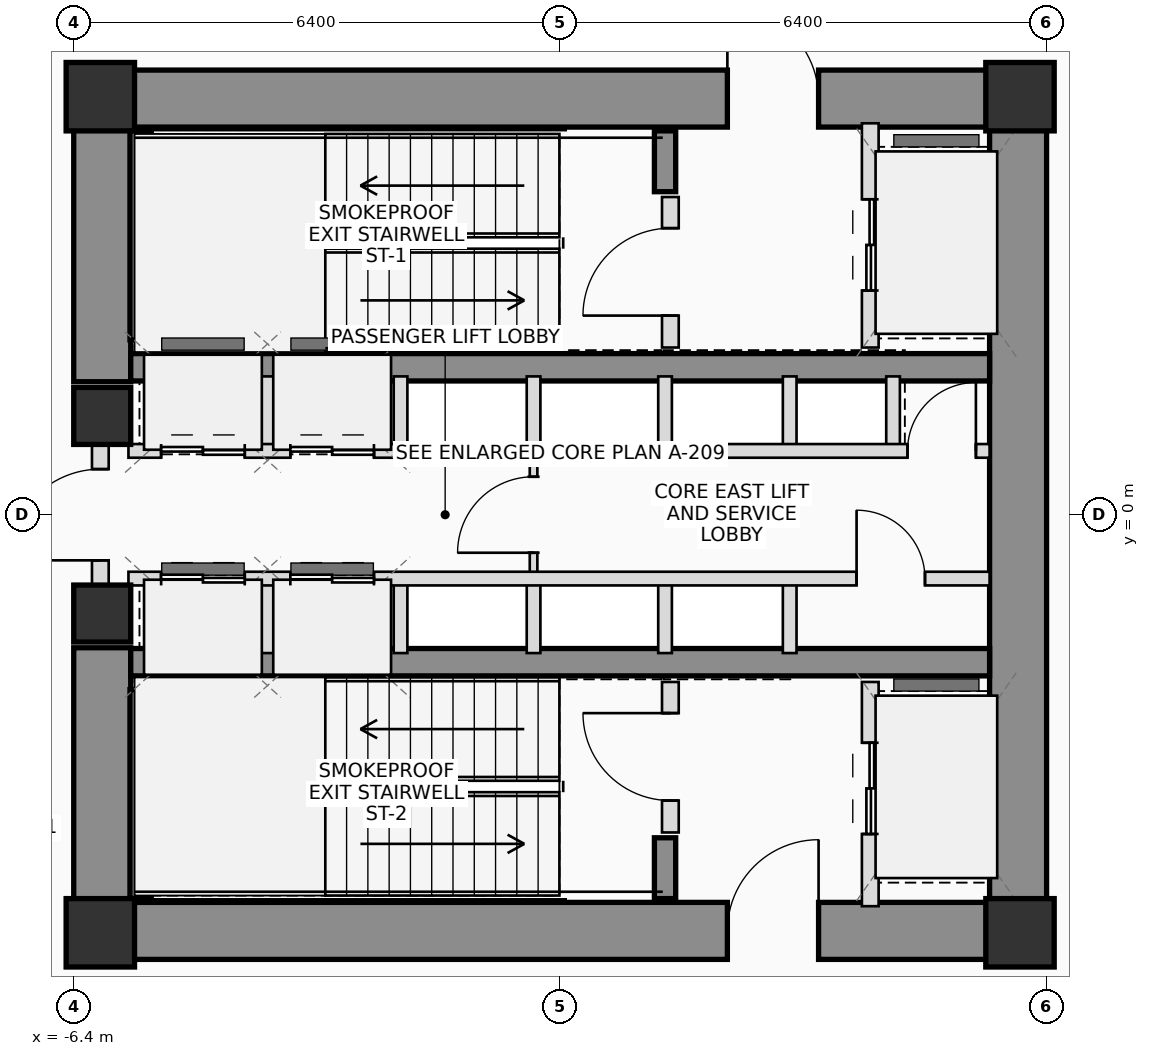
"""IFC4 building model, lengths in metres.
Left out: names, types, materials, properties, quantities, classifications, styles, units other than length and angle.
Written with IfcOpenShell. Run it as: python <this file> out.ifc"""

import sys

from ifc_helpers import new_model, si_unit, direction, frame, frame_2d, origin, origin_2d, place, context, subcontext, project, spatial, rectangle, extrude, source, transform, mapped, element, fill, save


model = new_model("IFC4")
c1 = context("Model", 3, precision=1e-05, world=origin(), true_north=direction((0.0, 1.0)))
c2 = subcontext(c1, "Body", "Model", "MODEL_VIEW")
j1 = project(units=[si_unit("LENGTHUNIT", "METRE"), si_unit("PLANEANGLEUNIT", "RADIAN")], contexts=[c1])
p1 = place(None, origin())
s1 = spatial("IfcSite", under=j1, at=p1, CompositionType="ELEMENT")
p2 = place(p1, origin())
s2 = spatial("IfcBuilding", under=s1, at=p2, CompositionType="ELEMENT")
p3 = place(p2, frame((0.0, 0.0, 101.15)))
s3 = spatial("IfcBuildingStorey", under=s2, at=p3, CompositionType="ELEMENT", Elevation=101.15)
m1 = source(origin(), c2, "Body", "SweptSolid", [
    extrude(rectangle(XDim=0.9, YDim=0.9, at=origin_2d()), origin(), (0.0, 0.0, 1.0), 3.75),
])
for number, where, z_axis, x_axis in (
    (1, (-6.05, -5.5, 0.0), (0.0, 0.0, 1.0), (1.0, 0.0, 0.0)),
    (2, (6.05, -5.5, 0.0), (0.0, 0.0, 1.0), (1.0, 0.0, 0.0)),
    (3, (6.05, 5.5, 0.0), (0.0, 0.0, 1.0), (1.0, 0.0, 0.0)),
    (4, (-6.05, 5.5, 0.0), (0.0, 0.0, 1.0), (1.0, 0.0, 0.0)),
):
    element("IfcColumn", number, at=place(p3, frame(where, z_axis=z_axis, x_axis=x_axis)), inside=s3, PredefinedType="COLUMN", context=c2, shape_type="MappedRepresentation", body=[
        mapped(m1, transform((0.0, 0.0, 0.0), scale=1.0)),
    ])
p4 = place(p3, frame((-6.4, 5.475, 0.0), z_axis=(0.0, 0.0, 1.0), x_axis=(1.0, 0.0, 0.0)))
e5 = element("IfcWall", 5, at=p4, inside=s3, PredefinedType="SHEAR", context=c2, shape_type="SweptSolid", body=[
    extrude(rectangle(XDim=12.8, YDim=0.75, at=frame_2d((6.4, 0.0))), origin(), (0.0, 0.0, 1.0), 3.75),
])
p5 = place(p4, frame((8.6, 0.0, 0.0)))
e6 = element("IfcOpeningElement", 6, at=p5, cuts=e5, PredefinedType="OPENING", context=c2, shape_type="SweptSolid", body=[
    extrude(rectangle(XDim=1.2, YDim=2.2, at=frame_2d((0.6, 1.1))), frame((0.0, 0.385, 0.0), z_axis=(0.0, -1.0, 0.0), x_axis=(1.0, 0.0, 0.0)), (0.0, 0.0, 1.0), 0.77),
])
p6 = place(p3, frame((-6.4, -5.475, 0.0), z_axis=(0.0, 0.0, 1.0), x_axis=(1.0, 0.0, 0.0)))
e7 = element("IfcWall", 7, at=p6, inside=s3, PredefinedType="SHEAR", context=c2, shape_type="SweptSolid", body=[
    extrude(rectangle(XDim=12.8, YDim=0.75, at=frame_2d((6.4, 0.0))), origin(), (0.0, 0.0, 1.0), 3.75),
])
p7 = place(p6, frame((8.6, 0.0, 0.0)))
e8 = element("IfcOpeningElement", 8, at=p7, cuts=e7, PredefinedType="OPENING", context=c2, shape_type="SweptSolid", body=[
    extrude(rectangle(XDim=1.2, YDim=2.2, at=frame_2d((0.6, 1.1))), frame((0.0, 0.385, 0.0), z_axis=(0.0, -1.0, 0.0), x_axis=(1.0, 0.0, 0.0)), (0.0, 0.0, 1.0), 0.77),
])
p8 = place(p3, frame((6.025, -5.1, 0.0), z_axis=(0.0, 0.0, 1.0), x_axis=(0.0, 1.0, 0.0)))
e9 = element("IfcWall", 9, at=p8, inside=s3, PredefinedType="SHEAR", context=c2, shape_type="SweptSolid", body=[
    extrude(rectangle(XDim=10.2, YDim=0.75, at=frame_2d((5.1, 0.0))), origin(), (0.0, 0.0, 1.0), 3.75),
])
for number, where, z_axis, x_axis in (
    (10, (-6.025, -5.1, 0.0), (0.0, 0.0, 1.0), (0.0, 1.0, 0.0)),
    (11, (-6.025, 1.75, 0.0), (0.0, 0.0, 1.0), (0.0, 1.0, 0.0)),
):
    element("IfcWall", number, at=place(p3, frame(where, z_axis=z_axis, x_axis=x_axis)), inside=s3, PredefinedType="SHEAR", context=c2, shape_type="SweptSolid", body=[
        extrude(rectangle(XDim=3.35, YDim=0.75, at=frame_2d((1.675, 0.0))), origin(), (0.0, 0.0, 1.0), 3.75),
    ])
for number, where, z_axis, x_axis in (
    (12, (-5.65, 1.94, 0.0), (0.0, 0.0, 1.0), (1.0, 0.0, 0.0)),
    (13, (-5.65, -1.94, 0.0), (0.0, 0.0, 1.0), (1.0, 0.0, 0.0)),
):
    element("IfcWall", number, at=place(p3, frame(where, z_axis=z_axis, x_axis=x_axis)), inside=s3, PredefinedType="SHEAR", context=c2, shape_type="SweptSolid", body=[
        extrude(rectangle(XDim=11.3, YDim=0.36, at=frame_2d((5.65, 0.0))), origin(), (0.0, 0.0, 1.0), 3.75),
    ])
p9 = place(p3, frame((-5.52, 2.3, 0.0), z_axis=(0.0, 0.0, 1.0), x_axis=(0.0, 1.0, 0.0)))
e14 = element("IfcWall", 14, at=p9, inside=s3, PredefinedType="SHEAR", context=c2, shape_type="SweptSolid", body=[
    extrude(rectangle(XDim=2.75, YDim=0.28, at=frame_2d((1.375, 0.0))), origin(), (0.0, 0.0, 1.0), 3.75),
])
p10 = place(p3, frame((1.38, 4.25, 0.0), z_axis=(0.0, 0.0, 1.0), x_axis=(0.0, 1.0, 0.0)))
e15 = element("IfcWall", 15, at=p10, inside=s3, PredefinedType="SHEAR", context=c2, shape_type="SweptSolid", body=[
    extrude(rectangle(XDim=0.8, YDim=0.28, at=frame_2d((0.4, 0.0))), origin(), (0.0, 0.0, 1.0), 3.75),
])
p11 = place(p3, frame((-5.52, -5.05, 0.0), z_axis=(0.0, 0.0, 1.0), x_axis=(0.0, 1.0, 0.0)))
e16 = element("IfcWall", 16, at=p11, inside=s3, PredefinedType="SHEAR", context=c2, shape_type="SweptSolid", body=[
    extrude(rectangle(XDim=2.75, YDim=0.28, at=frame_2d((1.375, 0.0))), origin(), (0.0, 0.0, 1.0), 3.75),
])
p12 = place(p3, frame((1.38, -5.05, 0.0), z_axis=(0.0, 0.0, 1.0), x_axis=(0.0, 1.0, 0.0)))
e17 = element("IfcWall", 17, at=p12, inside=s3, PredefinedType="SHEAR", context=c2, shape_type="SweptSolid", body=[
    extrude(rectangle(XDim=0.8, YDim=0.28, at=frame_2d((0.4, 0.0))), origin(), (0.0, 0.0, 1.0), 3.75),
])
m2 = source(origin(), c2, "Body", "SweptSolid", [
    extrude(rectangle(XDim=0.75, YDim=0.75, at=origin_2d()), origin(), (0.0, 0.0, 1.0), 3.75),
])
for number, where, z_axis, x_axis in (
    (18, (-6.025, -1.3, 0.0), (0.0, 0.0, 1.0), (1.0, 0.0, 0.0)),
    (19, (-6.025, 1.3, 0.0), (0.0, 0.0, 1.0), (1.0, 0.0, 0.0)),
):
    element("IfcColumn", number, at=place(p3, frame(where, z_axis=z_axis, x_axis=x_axis)), inside=s3, PredefinedType="COLUMN", context=c2, shape_type="MappedRepresentation", body=[
        mapped(m2, transform((0.0, 0.0, 0.0), scale=1.0)),
    ])
p13 = place(p3, frame((-6.05, -0.95, 0.0), z_axis=(0.0, 0.0, 1.0), x_axis=(0.0, 1.0, 0.0)))
e20 = element("IfcWall", 20, at=p13, inside=s3, PredefinedType="PLUMBINGWALL", context=c2, shape_type="SweptSolid", body=[
    extrude(rectangle(XDim=1.9, YDim=0.22, at=frame_2d((0.95, 0.0))), origin(), (0.0, 0.0, 1.0), 2.525),
])
p14 = place(p13, frame((0.35, 0.0, 0.0)))
e21 = element("IfcOpeningElement", 21, at=p14, cuts=e20, PredefinedType="OPENING", context=c2, shape_type="SweptSolid", body=[
    extrude(rectangle(XDim=1.2, YDim=2.2, at=frame_2d((0.6, 1.1))), frame((0.0, 0.12, 0.0), z_axis=(0.0, -1.0, 0.0), x_axis=(1.0, 0.0, 0.0)), (0.0, 0.0, 1.0), 0.24),
])
p15 = place(p3, frame((1.45, 2.2, 0.0), z_axis=(0.0, 0.0, 1.0), x_axis=(0.0, 1.0, 0.0)))
e22 = element("IfcWall", 22, at=p15, inside=s3, PredefinedType="PLUMBINGWALL", context=c2, shape_type="SweptSolid", body=[
    extrude(rectangle(XDim=1.98, YDim=0.22, at=frame_2d((0.99, 0.0))), origin(), (0.0, 0.0, 1.0), 3.545),
])
p16 = place(p15, frame((0.42, 0.0, 0.0)))
e23 = element("IfcOpeningElement", 23, at=p16, cuts=e22, PredefinedType="OPENING", context=c2, shape_type="SweptSolid", body=[
    extrude(rectangle(XDim=1.15, YDim=2.15, at=frame_2d((0.575, 1.075))), frame((0.0, 0.12, 0.0), z_axis=(0.0, -1.0, 0.0), x_axis=(1.0, 0.0, 0.0)), (0.0, 0.0, 1.0), 0.24),
])
p17 = place(p3, frame((4.08, 2.2, 0.0), z_axis=(0.0, 0.0, 1.0), x_axis=(0.0, 1.0, 0.0)))
e24 = element("IfcWall", 24, at=p17, inside=s3, PredefinedType="PLUMBINGWALL", context=c2, shape_type="SweptSolid", body=[
    extrude(rectangle(XDim=2.95, YDim=0.22, at=frame_2d((1.475, 0.0))), origin(), (0.0, 0.0, 1.0), 3.545),
])
p18 = place(p17, frame((0.75, 0.0, 0.0)))
e25 = element("IfcOpeningElement", 25, at=p18, cuts=e24, PredefinedType="OPENING", context=c2, shape_type="SweptSolid", body=[
    extrude(rectangle(XDim=1.2, YDim=2.25, at=frame_2d((0.6, 1.125))), frame((0.0, 0.12, 0.0), z_axis=(0.0, -1.0, 0.0), x_axis=(1.0, 0.0, 0.0)), (0.0, 0.0, 1.0), 0.24),
])
p19 = place(p3, frame((1.45, -4.18, 0.0), z_axis=(0.0, 0.0, 1.0), x_axis=(0.0, 1.0, 0.0)))
e26 = element("IfcWall", 26, at=p19, inside=s3, PredefinedType="PLUMBINGWALL", context=c2, shape_type="SweptSolid", body=[
    extrude(rectangle(XDim=1.98, YDim=0.22, at=frame_2d((0.99, 0.0))), origin(), (0.0, 0.0, 1.0), 3.545),
])
p20 = place(p19, frame((0.42, 0.0, 0.0)))
e27 = element("IfcOpeningElement", 27, at=p20, cuts=e26, PredefinedType="OPENING", context=c2, shape_type="SweptSolid", body=[
    extrude(rectangle(XDim=1.15, YDim=2.15, at=frame_2d((0.575, 1.075))), frame((0.0, 0.12, 0.0), z_axis=(0.0, -1.0, 0.0), x_axis=(1.0, 0.0, 0.0)), (0.0, 0.0, 1.0), 0.24),
])
p21 = place(p3, frame((4.08, -5.15, 0.0), z_axis=(0.0, 0.0, 1.0), x_axis=(0.0, 1.0, 0.0)))
e28 = element("IfcWall", 28, at=p21, inside=s3, PredefinedType="PLUMBINGWALL", context=c2, shape_type="SweptSolid", body=[
    extrude(rectangle(XDim=2.95, YDim=0.22, at=frame_2d((1.475, 0.0))), origin(), (0.0, 0.0, 1.0), 3.545),
])
p22 = place(p21, frame((0.95, 0.0, 0.0)))
e29 = element("IfcOpeningElement", 29, at=p22, cuts=e28, PredefinedType="OPENING", context=c2, shape_type="SweptSolid", body=[
    extrude(rectangle(XDim=1.2, YDim=2.25, at=frame_2d((0.6, 1.125))), frame((0.0, 0.12, 0.0), z_axis=(0.0, -1.0, 0.0), x_axis=(1.0, 0.0, 0.0)), (0.0, 0.0, 1.0), 0.24),
])
p23 = place(p3, frame((-0.35, -0.84, 0.0), z_axis=(0.0, 0.0, 1.0), x_axis=(0.0, 1.0, 0.0)))
e30 = element("IfcWall", 30, at=p23, inside=s3, PredefinedType="PARTITIONING", context=c2, shape_type="SweptSolid", body=[
    extrude(rectangle(XDim=1.68, YDim=0.1, at=frame_2d((0.84, 0.0))), origin(), (0.0, 0.0, 1.0), 3.545),
])
p24 = place(p23, frame((0.34, 0.0, 0.0)))
e31 = element("IfcOpeningElement", 31, at=p24, cuts=e30, PredefinedType="OPENING", context=c2, shape_type="SweptSolid", body=[
    extrude(rectangle(XDim=1.0, YDim=2.25, at=frame_2d((0.5, 1.125))), frame((0.0, 0.06, 0.0), z_axis=(0.0, -1.0, 0.0), x_axis=(1.0, 0.0, 0.0)), (0.0, 0.0, 1.0), 0.12),
])
for number, where, z_axis, x_axis in (
    (32, (-3.85, 0.84, 0.0), (0.0, 0.0, 1.0), (0.0, 1.0, 0.0)),
    (33, (-3.85, -1.82, 0.0), (0.0, 0.0, 1.0), (0.0, 1.0, 0.0)),
    (34, (-2.1, 0.84, 0.0), (0.0, 0.0, 1.0), (0.0, 1.0, 0.0)),
    (35, (-2.1, -1.82, 0.0), (0.0, 0.0, 1.0), (0.0, 1.0, 0.0)),
    (36, (-0.35, 0.84, 0.0), (0.0, 0.0, 1.0), (0.0, 1.0, 0.0)),
    (37, (-0.35, -1.82, 0.0), (0.0, 0.0, 1.0), (0.0, 1.0, 0.0)),
    (38, (1.38, 0.84, 0.0), (0.0, 0.0, 1.0), (0.0, 1.0, 0.0)),
    (39, (1.38, -1.82, 0.0), (0.0, 0.0, 1.0), (0.0, 1.0, 0.0)),
    (40, (3.02, 0.84, 0.0), (0.0, 0.0, 1.0), (0.0, 1.0, 0.0)),
    (41, (4.38, 0.84, 0.0), (0.0, 0.0, 1.0), (0.0, 1.0, 0.0)),
    (42, (3.02, -1.82, 0.0), (0.0, 0.0, 1.0), (0.0, 1.0, 0.0)),
):
    element("IfcWall", number, at=place(p3, frame(where, z_axis=z_axis, x_axis=x_axis)), inside=s3, PredefinedType="PLUMBINGWALL", context=c2, shape_type="SweptSolid", body=[
        extrude(rectangle(XDim=0.98, YDim=0.18, at=frame_2d((0.49, 0.0))), origin(), (0.0, 0.0, 1.0), 3.545),
    ])
p25 = place(p3, frame((-5.68, 0.84, 0.0), z_axis=(0.0, 0.0, 1.0), x_axis=(1.0, 0.0, 0.0)))
e43 = element("IfcWall", 43, at=p25, inside=s3, PredefinedType="PLUMBINGWALL", context=c2, shape_type="SweptSolid", body=[
    extrude(rectangle(XDim=11.33, YDim=0.18, at=frame_2d((5.665, 0.0))), origin(), (0.0, 0.0, 1.0), 3.545),
])
p26 = place(p25, frame((0.43, 0.0, 0.0)))
e44 = element("IfcOpeningElement", 44, at=p26, cuts=e43, PredefinedType="OPENING", context=c2, shape_type="SweptSolid", body=[
    extrude(rectangle(XDim=1.1, YDim=2.2, at=frame_2d((0.55, 1.1))), frame((0.0, 0.1, 0.0), z_axis=(0.0, -1.0, 0.0), x_axis=(1.0, 0.0, 0.0)), (0.0, 0.0, 1.0), 0.2),
])
p27 = place(p25, frame((2.13, 0.0, 0.0)))
e45 = element("IfcOpeningElement", 45, at=p27, cuts=e43, PredefinedType="OPENING", context=c2, shape_type="SweptSolid", body=[
    extrude(rectangle(XDim=1.1, YDim=2.2, at=frame_2d((0.55, 1.1))), frame((0.0, 0.1, 0.0), z_axis=(0.0, -1.0, 0.0), x_axis=(1.0, 0.0, 0.0)), (0.0, 0.0, 1.0), 0.2),
])
p28 = place(p25, frame((10.25, 0.0, 0.0)))
e46 = element("IfcOpeningElement", 46, at=p28, cuts=e43, PredefinedType="OPENING", context=c2, shape_type="SweptSolid", body=[
    extrude(rectangle(XDim=0.9, YDim=2.05, at=frame_2d((0.45, 1.025))), frame((0.0, 0.1, 0.0), z_axis=(0.0, -1.0, 0.0), x_axis=(1.0, 0.0, 0.0)), (0.0, 0.0, 1.0), 0.2),
])
p29 = place(p3, frame((-5.68, -0.84, 0.0), z_axis=(0.0, 0.0, 1.0), x_axis=(1.0, 0.0, 0.0)))
e47 = element("IfcWall", 47, at=p29, inside=s3, PredefinedType="PLUMBINGWALL", context=c2, shape_type="SweptSolid", body=[
    extrude(rectangle(XDim=11.33, YDim=0.18, at=frame_2d((5.665, 0.0))), origin(), (0.0, 0.0, 1.0), 3.545),
])
p30 = place(p29, frame((0.43, 0.0, 0.0)))
e48 = element("IfcOpeningElement", 48, at=p30, cuts=e47, PredefinedType="OPENING", context=c2, shape_type="SweptSolid", body=[
    extrude(rectangle(XDim=1.1, YDim=2.2, at=frame_2d((0.55, 1.1))), frame((0.0, 0.1, 0.0), z_axis=(0.0, -1.0, 0.0), x_axis=(1.0, 0.0, 0.0)), (0.0, 0.0, 1.0), 0.2),
])
p31 = place(p29, frame((2.13, 0.0, 0.0)))
e49 = element("IfcOpeningElement", 49, at=p31, cuts=e47, PredefinedType="OPENING", context=c2, shape_type="SweptSolid", body=[
    extrude(rectangle(XDim=1.1, YDim=2.2, at=frame_2d((0.55, 1.1))), frame((0.0, 0.1, 0.0), z_axis=(0.0, -1.0, 0.0), x_axis=(1.0, 0.0, 0.0)), (0.0, 0.0, 1.0), 0.2),
])
p32 = place(p29, frame((9.58, 0.0, 0.0)))
e50 = element("IfcOpeningElement", 50, at=p32, cuts=e47, PredefinedType="OPENING", context=c2, shape_type="SweptSolid", body=[
    extrude(rectangle(XDim=0.9, YDim=2.05, at=frame_2d((0.45, 1.025))), frame((0.0, 0.1, 0.0), z_axis=(0.0, -1.0, 0.0), x_axis=(1.0, 0.0, 0.0)), (0.0, 0.0, 1.0), 0.2),
])
p33 = place(p5, origin())
e51 = element("IfcDoor", 51, at=p33, inside=s3, OperationType="SINGLE_SWING_LEFT", PredefinedType="DOOR", context=c2, shape_type="SweptSolid", body=[
    extrude(rectangle(XDim=1.2, YDim=2.2, at=frame_2d((0.6, 1.1))), frame((0.0, 0.025, 0.0), z_axis=(0.0, -1.0, 0.0), x_axis=(1.0, 0.0, 0.0)), (0.0, 0.0, 1.0), 0.05),
])
fill(e6, e51)
p34 = place(p7, origin())
e52 = element("IfcDoor", 52, at=p34, inside=s3, OperationType="SINGLE_SWING_RIGHT", PredefinedType="DOOR", context=c2, shape_type="SweptSolid", body=[
    extrude(rectangle(XDim=1.2, YDim=2.2, at=frame_2d((0.6, 1.1))), frame((0.0, 0.025, 0.0), z_axis=(0.0, -1.0, 0.0), x_axis=(1.0, 0.0, 0.0)), (0.0, 0.0, 1.0), 0.05),
])
fill(e8, e52)
p35 = place(p14, origin())
e53 = element("IfcDoor", 53, at=p35, inside=s3, OperationType="SINGLE_SWING_LEFT", PredefinedType="DOOR", context=c2, shape_type="SweptSolid", body=[
    extrude(rectangle(XDim=1.2, YDim=2.2, at=frame_2d((0.6, 1.1))), frame((0.0, 0.025, 0.0), z_axis=(0.0, -1.0, 0.0), x_axis=(1.0, 0.0, 0.0)), (0.0, 0.0, 1.0), 0.05),
])
fill(e21, e53)
p36 = place(p16, origin())
e54 = element("IfcDoor", 54, at=p36, inside=s3, OperationType="SINGLE_SWING_LEFT", PredefinedType="DOOR", context=c2, shape_type="SweptSolid", body=[
    extrude(rectangle(XDim=1.15, YDim=2.15, at=frame_2d((0.575, 1.075))), frame((0.0, 0.025, 0.0), z_axis=(0.0, -1.0, 0.0), x_axis=(1.0, 0.0, 0.0)), (0.0, 0.0, 1.0), 0.05),
])
fill(e23, e54)
p37 = place(p18, origin())
e55 = element("IfcDoor", 55, at=p37, inside=s3, OperationType="DOUBLE_DOOR_SLIDING", PredefinedType="DOOR", context=c2, shape_type="SweptSolid", body=[
    extrude(rectangle(XDim=1.2, YDim=2.25, at=frame_2d((0.6, 1.125))), frame((0.0, 0.025, 0.0), z_axis=(0.0, -1.0, 0.0), x_axis=(1.0, 0.0, 0.0)), (0.0, 0.0, 1.0), 0.05),
])
fill(e25, e55)
p38 = place(p20, origin())
e56 = element("IfcDoor", 56, at=p38, inside=s3, OperationType="SINGLE_SWING_RIGHT", PredefinedType="DOOR", context=c2, shape_type="SweptSolid", body=[
    extrude(rectangle(XDim=1.15, YDim=2.15, at=frame_2d((0.575, 1.075))), frame((0.0, 0.025, 0.0), z_axis=(0.0, -1.0, 0.0), x_axis=(1.0, 0.0, 0.0)), (0.0, 0.0, 1.0), 0.05),
])
fill(e27, e56)
p39 = place(p22, origin())
e57 = element("IfcDoor", 57, at=p39, inside=s3, OperationType="DOUBLE_DOOR_SLIDING", PredefinedType="DOOR", context=c2, shape_type="SweptSolid", body=[
    extrude(rectangle(XDim=1.2, YDim=2.25, at=frame_2d((0.6, 1.125))), frame((0.0, 0.025, 0.0), z_axis=(0.0, -1.0, 0.0), x_axis=(1.0, 0.0, 0.0)), (0.0, 0.0, 1.0), 0.05),
])
fill(e29, e57)
p40 = place(p24, origin())
e58 = element("IfcDoor", 58, at=p40, inside=s3, OperationType="SINGLE_SWING_LEFT", PredefinedType="DOOR", context=c2, shape_type="SweptSolid", body=[
    extrude(rectangle(XDim=1.0, YDim=2.25, at=frame_2d((0.5, 1.125))), frame((0.0, 0.025, 0.0), z_axis=(0.0, -1.0, 0.0), x_axis=(1.0, 0.0, 0.0)), (0.0, 0.0, 1.0), 0.05),
])
fill(e31, e58)
p41 = place(p26, origin())
e59 = element("IfcDoor", 59, at=p41, inside=s3, OperationType="DOUBLE_DOOR_SLIDING", PredefinedType="DOOR", context=c2, shape_type="SweptSolid", body=[
    extrude(rectangle(XDim=1.1, YDim=2.2, at=frame_2d((0.55, 1.1))), frame((0.0, 0.025, 0.0), z_axis=(0.0, -1.0, 0.0), x_axis=(1.0, 0.0, 0.0)), (0.0, 0.0, 1.0), 0.05),
])
fill(e44, e59)
p42 = place(p27, origin())
e60 = element("IfcDoor", 60, at=p42, inside=s3, OperationType="DOUBLE_DOOR_SLIDING", PredefinedType="DOOR", context=c2, shape_type="SweptSolid", body=[
    extrude(rectangle(XDim=1.1, YDim=2.2, at=frame_2d((0.55, 1.1))), frame((0.0, 0.025, 0.0), z_axis=(0.0, -1.0, 0.0), x_axis=(1.0, 0.0, 0.0)), (0.0, 0.0, 1.0), 0.05),
])
fill(e45, e60)
p43 = place(p28, origin())
e61 = element("IfcDoor", 61, at=p43, inside=s3, OperationType="SINGLE_SWING_RIGHT", PredefinedType="DOOR", context=c2, shape_type="SweptSolid", body=[
    extrude(rectangle(XDim=0.9, YDim=2.05, at=frame_2d((0.45, 1.025))), frame((0.0, 0.025, 0.0), z_axis=(0.0, -1.0, 0.0), x_axis=(1.0, 0.0, 0.0)), (0.0, 0.0, 1.0), 0.05),
])
fill(e46, e61)
p44 = place(p30, origin())
e62 = element("IfcDoor", 62, at=p44, inside=s3, OperationType="DOUBLE_DOOR_SLIDING", PredefinedType="DOOR", context=c2, shape_type="SweptSolid", body=[
    extrude(rectangle(XDim=1.1, YDim=2.2, at=frame_2d((0.55, 1.1))), frame((0.0, 0.025, 0.0), z_axis=(0.0, -1.0, 0.0), x_axis=(1.0, 0.0, 0.0)), (0.0, 0.0, 1.0), 0.05),
])
fill(e48, e62)
p45 = place(p31, origin())
e63 = element("IfcDoor", 63, at=p45, inside=s3, OperationType="DOUBLE_DOOR_SLIDING", PredefinedType="DOOR", context=c2, shape_type="SweptSolid", body=[
    extrude(rectangle(XDim=1.1, YDim=2.2, at=frame_2d((0.55, 1.1))), frame((0.0, 0.025, 0.0), z_axis=(0.0, -1.0, 0.0), x_axis=(1.0, 0.0, 0.0)), (0.0, 0.0, 1.0), 0.05),
])
fill(e49, e63)
p46 = place(p32, origin())
e64 = element("IfcDoor", 64, at=p46, inside=s3, OperationType="SINGLE_SWING_LEFT", PredefinedType="DOOR", context=c2, shape_type="SweptSolid", body=[
    extrude(rectangle(XDim=0.9, YDim=2.05, at=frame_2d((0.45, 1.025))), frame((0.0, 0.025, 0.0), z_axis=(0.0, -1.0, 0.0), x_axis=(1.0, 0.0, 0.0)), (0.0, 0.0, 1.0), 0.05),
])
fill(e50, e64)
save(model, sys.argv[1])
